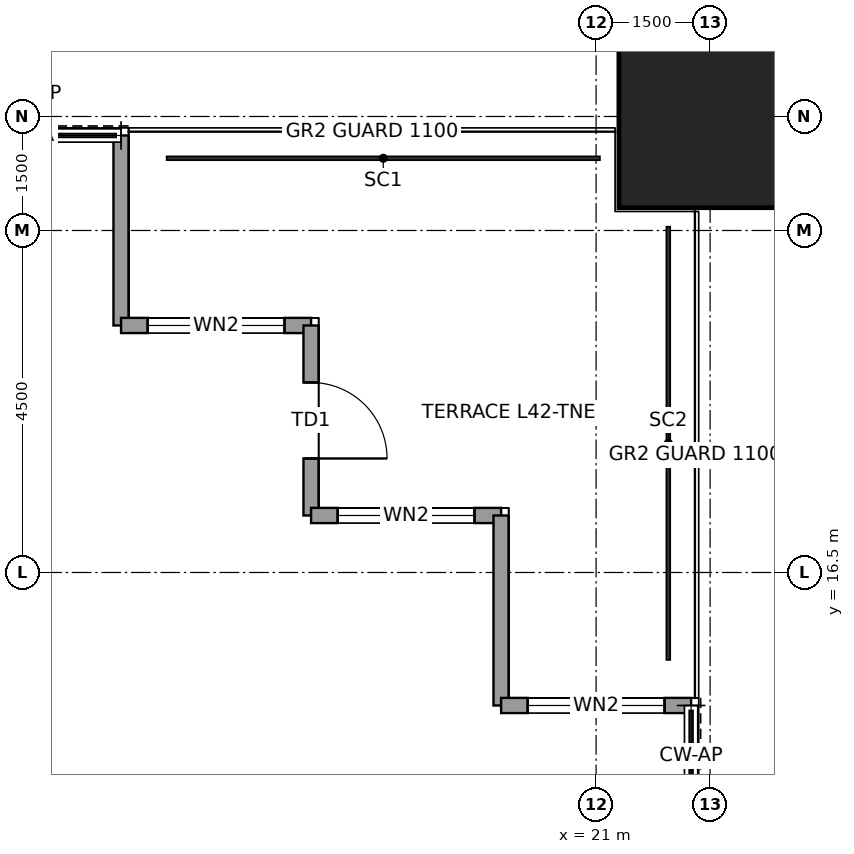
"""IFC4 building model, lengths in metres.
Left out: names, types, materials, properties, quantities, classifications, styles, units other than length and angle.
Written with IfcOpenShell. Run it as: python <this file> out.ifc"""

import sys

from ifc_helpers import new_model, si_unit, direction, frame, frame_2d, origin, origin_2d, place, context, subcontext, project, spatial, rectangle, hollow_rectangle, extrude, element, fill, save


model = new_model("IFC4")
c1 = context("Model", 3, precision=1e-05, world=origin(), true_north=direction((0.0, 1.0)))
c2 = subcontext(c1, "Body", "Model", "MODEL_VIEW")
j1 = project(units=[si_unit("LENGTHUNIT", "METRE"), si_unit("PLANEANGLEUNIT", "RADIAN")], contexts=[c1])
p1 = place(None, origin())
s1 = spatial("IfcSite", under=j1, at=p1, CompositionType="ELEMENT")
p2 = place(p1, origin())
s2 = spatial("IfcBuilding", under=s1, at=p2, CompositionType="ELEMENT")
p3 = place(p2, frame((0.0, 0.0, 201.9)))
s3 = spatial("IfcBuildingStorey", under=s2, at=p3, CompositionType="ELEMENT", Elevation=201.9)
p4 = place(p3, frame((22.5, 22.5, 0.0), z_axis=(0.0, 0.0, 1.0), x_axis=(1.0, 0.0, 0.0)))
e1 = element("IfcColumn", 1, at=p4, inside=s3, PredefinedType="COLUMN", context=c2, shape_type="SweptSolid", body=[
    extrude(hollow_rectangle(XDim=2.4, YDim=2.4, WallThickness=0.12, at=origin_2d()), origin(), (0.0, 0.0, 1.0), 4.0),
])
p5 = place(p3, frame((14.75, 22.25, 0.0), z_axis=(0.0, 0.0, 1.0), x_axis=(0.0, -1.0, 0.0)))
e2 = element("IfcWall", 2, at=p5, inside=s3, PredefinedType="SOLIDWALL", context=c2, shape_type="SweptSolid", body=[
    extrude(rectangle(XDim=2.5, YDim=0.2, at=frame_2d((1.25, 0.0))), origin(), (0.0, 0.0, 1.0), 3.85),
])
p6 = place(p3, frame((14.75, 19.75, 0.0), z_axis=(0.0, 0.0, 1.0), x_axis=(1.0, 0.0, 0.0)))
e3 = element("IfcWall", 3, at=p6, inside=s3, PredefinedType="SOLIDWALL", context=c2, shape_type="SweptSolid", body=[
    extrude(rectangle(XDim=2.5, YDim=0.2, at=frame_2d((1.25, 0.0))), origin(), (0.0, 0.0, 1.0), 3.85),
])
p7 = place(p6, frame((0.35, 0.0, 0.3)))
e4 = element("IfcOpeningElement", 4, at=p7, cuts=e3, PredefinedType="OPENING", context=c2, shape_type="SweptSolid", body=[
    extrude(rectangle(XDim=1.8, YDim=2.4, at=frame_2d((0.9, 1.2))), frame((0.0, 0.11, 0.0), z_axis=(0.0, -1.0, 0.0), x_axis=(1.0, 0.0, 0.0)), (0.0, 0.0, 1.0), 0.22),
])
p8 = place(p3, frame((17.25, 19.75, 0.0), z_axis=(0.0, 0.0, 1.0), x_axis=(0.0, -1.0, 0.0)))
e5 = element("IfcWall", 5, at=p8, inside=s3, PredefinedType="SOLIDWALL", context=c2, shape_type="SweptSolid", body=[
    extrude(rectangle(XDim=2.5, YDim=0.2, at=frame_2d((1.25, 0.0))), origin(), (0.0, 0.0, 1.0), 3.85),
])
p9 = place(p8, frame((0.75, 0.0, 0.0)))
e6 = element("IfcOpeningElement", 6, at=p9, cuts=e5, PredefinedType="OPENING", context=c2, shape_type="SweptSolid", body=[
    extrude(rectangle(XDim=1.0, YDim=2.4, at=frame_2d((0.5, 1.2))), frame((0.0, 0.11, 0.0), z_axis=(0.0, -1.0, 0.0), x_axis=(1.0, 0.0, 0.0)), (0.0, 0.0, 1.0), 0.22),
])
p10 = place(p3, frame((17.25, 17.25, 0.0), z_axis=(0.0, 0.0, 1.0), x_axis=(1.0, 0.0, 0.0)))
e7 = element("IfcWall", 7, at=p10, inside=s3, PredefinedType="SOLIDWALL", context=c2, shape_type="SweptSolid", body=[
    extrude(rectangle(XDim=2.5, YDim=0.2, at=frame_2d((1.25, 0.0))), origin(), (0.0, 0.0, 1.0), 3.85),
])
p11 = place(p10, frame((0.35, 0.0, 0.3)))
e8 = element("IfcOpeningElement", 8, at=p11, cuts=e7, PredefinedType="OPENING", context=c2, shape_type="SweptSolid", body=[
    extrude(rectangle(XDim=1.8, YDim=2.4, at=frame_2d((0.9, 1.2))), frame((0.0, 0.11, 0.0), z_axis=(0.0, -1.0, 0.0), x_axis=(1.0, 0.0, 0.0)), (0.0, 0.0, 1.0), 0.22),
])
p12 = place(p3, frame((19.75, 17.25, 0.0), z_axis=(0.0, 0.0, 1.0), x_axis=(0.0, -1.0, 0.0)))
e9 = element("IfcWall", 9, at=p12, inside=s3, PredefinedType="SOLIDWALL", context=c2, shape_type="SweptSolid", body=[
    extrude(rectangle(XDim=2.5, YDim=0.2, at=frame_2d((1.25, 0.0))), origin(), (0.0, 0.0, 1.0), 3.85),
])
p13 = place(p3, frame((19.75, 14.75, 0.0), z_axis=(0.0, 0.0, 1.0), x_axis=(1.0, 0.0, 0.0)))
e10 = element("IfcWall", 10, at=p13, inside=s3, PredefinedType="SOLIDWALL", context=c2, shape_type="SweptSolid", body=[
    extrude(rectangle(XDim=2.5, YDim=0.2, at=frame_2d((1.25, 0.0))), origin(), (0.0, 0.0, 1.0), 3.85),
])
p14 = place(p13, frame((0.35, 0.0, 0.3)))
e11 = element("IfcOpeningElement", 11, at=p14, cuts=e10, PredefinedType="OPENING", context=c2, shape_type="SweptSolid", body=[
    extrude(rectangle(XDim=1.8, YDim=2.4, at=frame_2d((0.9, 1.2))), frame((0.0, 0.11, 0.0), z_axis=(0.0, -1.0, 0.0), x_axis=(1.0, 0.0, 0.0)), (0.0, 0.0, 1.0), 0.22),
])
p15 = place(p7, origin())
e12 = element("IfcWindow", 12, at=p15, inside=s3, PartitioningType="SINGLE_PANEL", PredefinedType="WINDOW", context=c2, shape_type="SweptSolid", body=[
    extrude(rectangle(XDim=1.8, YDim=2.4, at=frame_2d((0.9, 1.2))), frame((0.0, 0.03, 0.0), z_axis=(0.0, -1.0, 0.0), x_axis=(1.0, 0.0, 0.0)), (0.0, 0.0, 1.0), 0.06),
])
fill(e4, e12)
p16 = place(p9, origin())
e13 = element("IfcDoor", 13, at=p16, inside=s3, OperationType="SINGLE_SWING_RIGHT", PredefinedType="DOOR", context=c2, shape_type="SweptSolid", body=[
    extrude(rectangle(XDim=1.0, YDim=2.4, at=frame_2d((0.5, 1.2))), frame((0.0, 0.025, 0.0), z_axis=(0.0, -1.0, 0.0), x_axis=(1.0, 0.0, 0.0)), (0.0, 0.0, 1.0), 0.05),
])
fill(e6, e13)
p17 = place(p11, origin())
e14 = element("IfcWindow", 14, at=p17, inside=s3, PartitioningType="SINGLE_PANEL", PredefinedType="WINDOW", context=c2, shape_type="SweptSolid", body=[
    extrude(rectangle(XDim=1.8, YDim=2.4, at=frame_2d((0.9, 1.2))), frame((0.0, 0.03, 0.0), z_axis=(0.0, -1.0, 0.0), x_axis=(1.0, 0.0, 0.0)), (0.0, 0.0, 1.0), 0.06),
])
fill(e8, e14)
p18 = place(p14, origin())
e15 = element("IfcWindow", 15, at=p18, inside=s3, PartitioningType="SINGLE_PANEL", PredefinedType="WINDOW", context=c2, shape_type="SweptSolid", body=[
    extrude(rectangle(XDim=1.8, YDim=2.4, at=frame_2d((0.9, 1.2))), frame((0.0, 0.03, 0.0), z_axis=(0.0, -1.0, 0.0), x_axis=(1.0, 0.0, 0.0)), (0.0, 0.0, 1.0), 0.06),
])
fill(e11, e15)
save(model, sys.argv[1])
